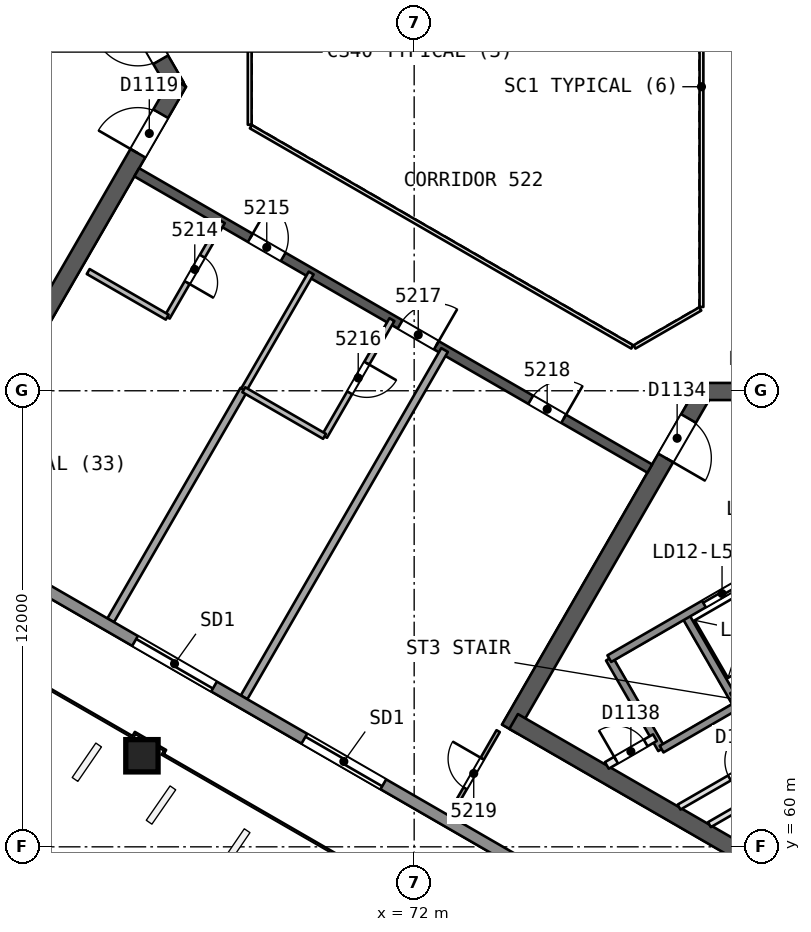
"""IFC4 building model, lengths in metres.
Left out: names, types, materials, properties, quantities, classifications, styles, units other than length and angle.
Written with IfcOpenShell. Run it as: python <this file> out.ifc"""

import sys

from ifc_helpers import new_model, si_unit, direction, frame, frame_2d, origin, origin_2d, place, context, subcontext, project, spatial, rectangle, extrude, element, fill, save


model = new_model("IFC4")
c1 = context("Model", 3, precision=1e-05, world=origin(), true_north=direction((0.0, 1.0)))
c2 = subcontext(c1, "Body", "Model", "MODEL_VIEW")
j1 = project(units=[si_unit("LENGTHUNIT", "METRE"), si_unit("PLANEANGLEUNIT", "RADIAN")], contexts=[c1])
p1 = place(None, origin())
s1 = spatial("IfcSite", under=j1, at=p1, CompositionType="ELEMENT")
p2 = place(p1, origin())
s2 = spatial("IfcBuilding", under=s1, at=p2, CompositionType="ELEMENT")
p3 = place(p2, frame((0.0, 0.0, 213.2)))
s3 = spatial("IfcBuildingStorey", under=s2, at=p3, CompositionType="ELEMENT", Elevation=213.2)
p4 = place(p3, frame((65.74, 80.0, 0.0), z_axis=(0.0, 0.0, 1.0), x_axis=(-0.499991857942, 0.866030104553, 0.0)))
e1 = element("IfcWall", 1, at=p4, inside=s3, PredefinedType="SHEAR", context=c2, shape_type="SweptSolid", body=[
    extrude(rectangle(XDim=10.25, YDim=0.45, at=frame_2d((5.125, 0.0))), origin(), (0.0, 0.0, 1.0), 3.7),
])
p5 = place(p4, frame((0.82, 0.0, 0.0)))
e2 = element("IfcOpeningElement", 2, at=p5, cuts=e1, PredefinedType="OPENING", context=c2, shape_type="SweptSolid", body=[
    extrude(rectangle(XDim=1.2, YDim=2.1, at=frame_2d((0.6, 1.05))), frame((0.0, 0.235, 0.0), z_axis=(0.0, -1.0, 0.0), x_axis=(1.0, 0.0, 0.0)), (0.0, 0.0, 1.0), 0.471),
])
p6 = place(p3, frame((60.728, 71.318, 0.0), z_axis=(0.0, 0.0, 1.0), x_axis=(0.500012416173, 0.866018235185, 0.0)))
e3 = element("IfcWall", 3, at=p6, inside=s3, PredefinedType="SHEAR", context=c2, shape_type="SweptSolid", body=[
    extrude(rectangle(XDim=10.155, YDim=0.45, at=frame_2d((5.078, 0.0))), origin(), (0.0, 0.0, 1.0), 3.7),
])
p7 = place(p6, frame((8.005, 0.0, 0.0)))
e4 = element("IfcOpeningElement", 4, at=p7, cuts=e3, PredefinedType="OPENING", context=c2, shape_type="SweptSolid", body=[
    extrude(rectangle(XDim=1.2, YDim=2.1, at=frame_2d((0.6, 1.05))), frame((0.0, 0.235, 0.0), z_axis=(0.0, -1.0, 0.0), x_axis=(1.0, 0.0, 0.0)), (0.0, 0.0, 1.0), 0.471),
])
p8 = place(p3, frame((79.63, 71.981, 0.0), z_axis=(0.0, 0.0, 1.0), x_axis=(-0.500002171595, -0.86602415001, 0.0)))
e5 = element("IfcWall", 5, at=p8, inside=s3, PredefinedType="SHEAR", context=c2, shape_type="SweptSolid", body=[
    extrude(rectangle(XDim=10.25, YDim=0.45, at=frame_2d((5.125, 0.0))), origin(), (0.0, 0.0, 1.0), 3.7),
])
p9 = place(p8, frame((0.82, 0.0, 0.0)))
e6 = element("IfcOpeningElement", 6, at=p9, cuts=e5, PredefinedType="OPENING", context=c2, shape_type="SweptSolid", body=[
    extrude(rectangle(XDim=1.2, YDim=2.1, at=frame_2d((0.6, 1.05))), frame((0.0, 0.235, 0.0), z_axis=(0.0, -1.0, 0.0), x_axis=(1.0, 0.0, 0.0)), (0.0, 0.0, 1.0), 0.471),
])
p10 = place(p3, frame((74.617, 63.299, 0.0), z_axis=(0.0, 0.0, 1.0), x_axis=(0.86602594008, -0.499999071108, 0.0)))
e7 = element("IfcWall", 7, at=p10, inside=s3, PredefinedType="SHEAR", context=c2, shape_type="SweptSolid", body=[
    extrude(rectangle(XDim=14.108, YDim=0.45, at=frame_2d((7.054, 0.0))), origin(), (0.0, 0.0, 1.0), 3.7),
])
p11 = place(p3, frame((89.655, 71.981, 0.0), z_axis=(0.0, 0.0, 1.0), x_axis=(-1.0, 0.0, 0.0)))
e8 = element("IfcWall", 8, at=p11, inside=s3, PredefinedType="SHEAR", context=c2, shape_type="SweptSolid", body=[
    extrude(rectangle(XDim=10.155, YDim=0.45, at=frame_2d((5.078, 0.0))), origin(), (0.0, 0.0, 1.0), 3.7),
])
p12 = place(p11, frame((8.005, 0.0, 0.0)))
e9 = element("IfcOpeningElement", 9, at=p12, cuts=e8, PredefinedType="OPENING", context=c2, shape_type="SweptSolid", body=[
    extrude(rectangle(XDim=1.2, YDim=2.1, at=frame_2d((0.6, 1.05))), frame((0.0, 0.235, 0.0), z_axis=(0.0, -1.0, 0.0), x_axis=(1.0, 0.0, 0.0)), (0.0, 0.0, 1.0), 0.471),
])
p13 = place(p3, frame((64.7, 77.748, 0.0), z_axis=(0.0, 0.0, 1.0), x_axis=(0.866026492143, -0.499998114903, 0.0)))
e10 = element("IfcWall", 10, at=p13, inside=s3, PredefinedType="SHEAR", context=c2, shape_type="SweptSolid", body=[
    extrude(rectangle(XDim=15.588, YDim=0.25, at=frame_2d((7.794, 0.0))), origin(), (0.0, 0.0, 1.0), 3.3),
])
p14 = place(p13, frame((3.45, 0.0, 0.0)))
e11 = element("IfcOpeningElement", 11, at=p14, cuts=e10, PredefinedType="OPENING", context=c2, shape_type="SweptSolid", body=[
    extrude(rectangle(XDim=1.0, YDim=2.1, at=frame_2d((0.5, 1.05))), frame((0.0, 0.135, 0.0), z_axis=(0.0, -1.0, 0.0), x_axis=(1.0, 0.0, 0.0)), (0.0, 0.0, 1.0), 0.271),
])
p15 = place(p13, frame((8.003, 0.0, 0.0)))
e12 = element("IfcOpeningElement", 12, at=p15, cuts=e10, PredefinedType="OPENING", context=c2, shape_type="SweptSolid", body=[
    extrude(rectangle(XDim=1.1, YDim=2.1, at=frame_2d((0.55, 1.05))), frame((0.0, 0.135, 0.0), z_axis=(0.0, -1.0, 0.0), x_axis=(1.0, 0.0, 0.0)), (0.0, 0.0, 1.0), 0.271),
])
p16 = place(p13, frame((11.971, 0.0, 0.0)))
e13 = element("IfcOpeningElement", 13, at=p16, cuts=e10, PredefinedType="OPENING", context=c2, shape_type="SweptSolid", body=[
    extrude(rectangle(XDim=1.0, YDim=2.1, at=frame_2d((0.5, 1.05))), frame((0.0, 0.135, 0.0), z_axis=(0.0, -1.0, 0.0), x_axis=(1.0, 0.0, 0.0)), (0.0, 0.0, 1.0), 0.271),
])
p17 = place(p3, frame((64.824, 62.375, 0.0), z_axis=(0.010093620709, 0.017482414954, 0.999796221231), x_axis=(-0.499922962701, -0.86583457736, 0.020187025819)))
e14 = element("IfcColumn", 14, at=p17, inside=s3, PredefinedType="COLUMN", context=c2, shape_type="SweptSolid", body=[
    extrude(rectangle(XDim=0.85, YDim=0.85, at=origin_2d()), origin(), (0.0, 0.0, 1.0), 3.701),
])
p18 = place(p3, frame((66.952, 76.448, 0.0), z_axis=(0.0, 0.0, 1.0), x_axis=(-0.499987231761, -0.866032775405, 0.0)))
e15 = element("IfcWall", 15, at=p18, inside=s3, PredefinedType="PARTITIONING", context=c2, shape_type="SweptSolid", body=[
    extrude(rectangle(XDim=2.9, YDim=0.15, at=frame_2d((1.45, 0.0))), origin(), (0.0, 0.0, 1.0), 3.3),
])
p19 = place(p18, frame((1.05, 0.0, 0.0)))
e16 = element("IfcOpeningElement", 16, at=p19, cuts=e15, PredefinedType="OPENING", context=c2, shape_type="SweptSolid", body=[
    extrude(rectangle(XDim=0.8, YDim=2.1, at=frame_2d((0.4, 1.05))), frame((0.0, 0.085, 0.0), z_axis=(0.0, -1.0, 0.0), x_axis=(1.0, 0.0, 0.0)), (0.0, 0.0, 1.0), 0.171),
])
p20 = place(p3, frame((65.502, 73.937, 0.0), z_axis=(0.0, 0.0, 1.0), x_axis=(-0.865994240961, 0.500053971709, 0.0)))
e17 = element("IfcWall", 17, at=p20, inside=s3, PredefinedType="PARTITIONING", context=c2, shape_type="SweptSolid", body=[
    extrude(rectangle(XDim=2.401, YDim=0.15, at=frame_2d((1.201, 0.0))), origin(), (0.0, 0.0, 1.0), 3.3),
])
p21 = place(p3, frame((64.014, 65.96, 0.0), z_axis=(0.0, 0.0, 1.0), x_axis=(0.499980879723, 0.8660364426, 0.0)))
e18 = element("IfcWall", 18, at=p21, inside=s3, PredefinedType="PARTITIONING", context=c2, shape_type="SweptSolid", body=[
    extrude(rectangle(XDim=7.006, YDim=0.2, at=frame_2d((3.503, 0.0))), origin(), (0.0, 0.0, 1.0), 3.3),
])
p22 = place(p3, frame((67.517, 72.027, 0.0), z_axis=(0.0, 0.0, 1.0), x_axis=(0.500018392462, 0.866014784631, 0.0)))
e19 = element("IfcWall", 19, at=p22, inside=s3, PredefinedType="PARTITIONING", context=c2, shape_type="SweptSolid", body=[
    extrude(rectangle(XDim=3.547, YDim=0.15, at=frame_2d((1.773, 0.0))), origin(), (0.0, 0.0, 1.0), 3.3),
])
p23 = place(p3, frame((71.414, 73.872, 0.0), z_axis=(0.0, 0.0, 1.0), x_axis=(-0.499966764714, -0.866044591335, 0.0)))
e20 = element("IfcWall", 20, at=p23, inside=s3, PredefinedType="PARTITIONING", context=c2, shape_type="SweptSolid", body=[
    extrude(rectangle(XDim=3.547, YDim=0.15, at=frame_2d((1.773, 0.0))), origin(), (0.0, 0.0, 1.0), 3.3),
])
p24 = place(p23, frame((1.323, 0.0, 0.0)))
e21 = element("IfcOpeningElement", 21, at=p24, cuts=e20, PredefinedType="OPENING", context=c2, shape_type="SweptSolid", body=[
    extrude(rectangle(XDim=0.9, YDim=2.1, at=frame_2d((0.45, 1.05))), frame((0.0, 0.085, 0.0), z_axis=(0.0, -1.0, 0.0), x_axis=(1.0, 0.0, 0.0)), (0.0, 0.0, 1.0), 0.171),
])
p25 = place(p3, frame((69.641, 70.8, 0.0), z_axis=(0.0, 0.0, 1.0), x_axis=(-0.866029801145, 0.49999238347, 0.0)))
e22 = element("IfcWall", 22, at=p25, inside=s3, PredefinedType="PARTITIONING", context=c2, shape_type="SweptSolid", body=[
    extrude(rectangle(XDim=2.453, YDim=0.15, at=frame_2d((1.227, 0.0))), origin(), (0.0, 0.0, 1.0), 3.3),
])
p26 = place(p3, frame((67.524, 63.933, 0.0), z_axis=(0.0, 0.0, 1.0), x_axis=(0.499993488173, 0.866029163357, 0.0)))
e23 = element("IfcWall", 23, at=p26, inside=s3, PredefinedType="PARTITIONING", context=c2, shape_type="SweptSolid", body=[
    extrude(rectangle(XDim=10.552, YDim=0.2, at=frame_2d((5.276, 0.0))), origin(), (0.0, 0.0, 1.0), 3.3),
])
p27 = place(p3, frame((72.924, 60.815, 0.0), z_axis=(0.0, 0.0, 1.0), x_axis=(0.49995513091, 0.866051307416, 0.0)))
e24 = element("IfcWall", 24, at=p27, inside=s3, PredefinedType="PARTITIONING", context=c2, shape_type="SweptSolid", body=[
    extrude(rectangle(XDim=2.573, YDim=0.1, at=frame_2d((1.287, 0.0))), origin(), (0.0, 0.0, 1.0), 3.3),
])
p28 = place(p27, frame((0.837, 0.0, 0.0)))
e25 = element("IfcOpeningElement", 25, at=p28, cuts=e24, PredefinedType="OPENING", context=c2, shape_type="SweptSolid", body=[
    extrude(rectangle(XDim=0.9, YDim=2.1, at=frame_2d((0.45, 1.05))), frame((0.0, 0.061, 0.0), z_axis=(0.0, -1.0, 0.0), x_axis=(1.0, 0.0, 0.0)), (0.0, 0.0, 1.0), 0.121),
])
p29 = place(p3, frame((88.266, 51.786, 0.0), z_axis=(0.0, 0.0, 1.0), x_axis=(-0.866026349667, 0.49999836168, 0.0)))
e26 = element("IfcWall", 26, at=p29, inside=s3, PredefinedType="SOLIDWALL", context=c2, shape_type="SweptSolid", body=[
    extrude(rectangle(XDim=51.192, YDim=0.3, at=frame_2d((25.596, 0.0))), origin(), (0.0, 0.0, 1.0), 3.3),
])
p30 = place(p29, frame((24.864, 0.0, 0.0)))
e27 = element("IfcOpeningElement", 27, at=p30, cuts=e26, PredefinedType="OPENING", context=c2, shape_type="SweptSolid", body=[
    extrude(rectangle(XDim=2.4, YDim=2.4, at=frame_2d((1.2, 1.2))), frame((0.0, 0.161, 0.0), z_axis=(0.0, -1.0, 0.0), x_axis=(1.0, 0.0, 0.0)), (0.0, 0.0, 1.0), 0.321),
])
p31 = place(p29, frame((19.719, 0.0, 0.0)))
e28 = element("IfcOpeningElement", 28, at=p31, cuts=e26, PredefinedType="OPENING", context=c2, shape_type="SweptSolid", body=[
    extrude(rectangle(XDim=2.4, YDim=2.4, at=frame_2d((1.2, 1.2))), frame((0.0, 0.161, 0.0), z_axis=(0.0, -1.0, 0.0), x_axis=(1.0, 0.0, 0.0)), (0.0, 0.0, 1.0), 0.321),
])
p32 = place(p29, frame((8.993, 0.0, 0.0)))
e29 = element("IfcOpeningElement", 29, at=p32, cuts=e26, PredefinedType="OPENING", context=c2, shape_type="SweptSolid", body=[
    extrude(rectangle(XDim=2.4, YDim=2.4, at=frame_2d((1.2, 1.2))), frame((0.0, 0.161, 0.0), z_axis=(0.0, -1.0, 0.0), x_axis=(1.0, 0.0, 0.0)), (0.0, 0.0, 1.0), 0.321),
])
p33 = place(p29, frame((38.484, 0.0, 0.0)))
e30 = element("IfcOpeningElement", 30, at=p33, cuts=e26, PredefinedType="OPENING", context=c2, shape_type="SweptSolid", body=[
    extrude(rectangle(XDim=2.4, YDim=2.4, at=frame_2d((1.2, 1.2))), frame((0.0, 0.161, 0.0), z_axis=(0.0, -1.0, 0.0), x_axis=(1.0, 0.0, 0.0)), (0.0, 0.0, 1.0), 0.321),
])
for number, where, z_axis, x_axis in (
    (31, (77.135, 64.952, 0.0), (0.0, 0.0, 1.0), (0.5, -0.866, 0.0)),
    (32, (79.127, 66.102, 0.0), (0.0, 0.0, 1.0), (0.5, -0.866, 0.0)),
):
    element("IfcWall", number, at=place(p3, frame(where, z_axis=z_axis, x_axis=x_axis)), inside=s3, PredefinedType="SOLIDWALL", context=c2, shape_type="SweptSolid", body=[
        extrude(rectangle(XDim=2.75, YDim=0.2, at=frame_2d((1.375, 0.0))), origin(), (0.0, 0.0, 1.0), 3.3),
    ])
p34 = place(p3, frame((77.135, 64.952, 0.0), z_axis=(0.0, 0.0, 1.0), x_axis=(0.866031916153, 0.499988720078, 0.0)))
e33 = element("IfcWall", 33, at=p34, inside=s3, PredefinedType="SOLIDWALL", context=c2, shape_type="SweptSolid", body=[
    extrude(rectangle(XDim=11.35, YDim=0.2, at=frame_2d((5.675, 0.0))), origin(), (0.0, 0.0, 1.0), 3.3),
])
p35 = place(p34, frame((2.875, 0.0, 0.0)))
e34 = element("IfcOpeningElement", 34, at=p35, cuts=e33, PredefinedType="OPENING", context=c2, shape_type="SweptSolid", body=[
    extrude(rectangle(XDim=1.1, YDim=2.1, at=frame_2d((0.55, 1.05))), frame((0.0, 0.11, 0.0), z_axis=(0.0, -1.0, 0.0), x_axis=(1.0, 0.0, 0.0)), (0.0, 0.0, 1.0), 0.221),
])
p36 = place(p34, frame((5.125, 0.0, 0.0)))
e35 = element("IfcOpeningElement", 35, at=p36, cuts=e33, PredefinedType="OPENING", context=c2, shape_type="SweptSolid", body=[
    extrude(rectangle(XDim=1.1, YDim=2.1, at=frame_2d((0.55, 1.05))), frame((0.0, 0.11, 0.0), z_axis=(0.0, -1.0, 0.0), x_axis=(1.0, 0.0, 0.0)), (0.0, 0.0, 1.0), 0.221),
])
p37 = place(p34, frame((7.375, 0.0, 0.0)))
e36 = element("IfcOpeningElement", 36, at=p37, cuts=e33, PredefinedType="OPENING", context=c2, shape_type="SweptSolid", body=[
    extrude(rectangle(XDim=1.1, YDim=2.1, at=frame_2d((0.55, 1.05))), frame((0.0, 0.11, 0.0), z_axis=(0.0, -1.0, 0.0), x_axis=(1.0, 0.0, 0.0)), (0.0, 0.0, 1.0), 0.221),
])
p38 = place(p3, frame((77.07, 62.143, 0.0), z_axis=(0.0, 0.0, 1.0), x_axis=(0.866013036001, 0.500021421018, 0.0)))
e37 = element("IfcWall", 37, at=p38, inside=s3, PredefinedType="PARTITIONING", context=c2, shape_type="SweptSolid", body=[
    extrude(rectangle(XDim=1.461, YDim=0.2, at=frame_2d((0.73, 0.0))), origin(), (0.0, 0.0, 1.0), 3.3),
])
p39 = place(p38, frame((0.281, 0.0, 0.0)))
e38 = element("IfcOpeningElement", 38, at=p39, cuts=e37, PredefinedType="OPENING", context=c2, shape_type="SweptSolid", body=[
    extrude(rectangle(XDim=0.9, YDim=2.1, at=frame_2d((0.45, 1.05))), frame((0.0, 0.11, 0.0), z_axis=(0.0, -1.0, 0.0), x_axis=(1.0, 0.0, 0.0)), (0.0, 0.0, 1.0), 0.221),
])
p40 = place(p3, frame((80.367, 63.954, 0.0), z_axis=(0.0, 0.0, 1.0), x_axis=(0.866026575979, 0.499997969693, 0.0)))
e39 = element("IfcWall", 39, at=p40, inside=s3, PredefinedType="SOLIDWALL", context=c2, shape_type="SweptSolid", body=[
    extrude(rectangle(XDim=6.75, YDim=0.2, at=frame_2d((3.375, 0.0))), origin(), (0.0, 0.0, 1.0), 3.3),
])
p41 = place(p3, frame((78.51, 62.57, 0.0), z_axis=(0.0, 0.0, 1.0), x_axis=(0.866053019151, 0.499952165731, 0.0)))
e40 = element("IfcWall", 40, at=p41, inside=s3, PredefinedType="SOLIDWALL", context=c2, shape_type="SweptSolid", body=[
    extrude(rectangle(XDim=2.3, YDim=0.2, at=frame_2d((1.15, 0.0))), origin(), (0.0, 0.0, 1.0), 3.3),
])
p42 = place(p3, frame((78.97, 61.046, 0.0), z_axis=(0.0, 0.0, 1.0), x_axis=(0.866044057189, 0.499967689963, 0.0)))
e41 = element("IfcWall", 41, at=p42, inside=s3, PredefinedType="PARTITIONING", context=c2, shape_type="SweptSolid", body=[
    extrude(rectangle(XDim=3.964, YDim=0.15, at=frame_2d((1.982, 0.0))), origin(), (0.0, 0.0, 1.0), 3.3),
])
p43 = place(p42, frame((1.532, 0.0, 0.0)))
e42 = element("IfcOpeningElement", 42, at=p43, cuts=e41, PredefinedType="OPENING", context=c2, shape_type="SweptSolid", body=[
    extrude(rectangle(XDim=0.9, YDim=2.1, at=frame_2d((0.45, 1.05))), frame((0.0, 0.085, 0.0), z_axis=(0.0, -1.0, 0.0), x_axis=(1.0, 0.0, 0.0)), (0.0, 0.0, 1.0), 0.171),
])
p44 = place(p3, frame((79.77, 60.584, 0.0), z_axis=(0.0, 0.0, 1.0), x_axis=(0.866021168401, 0.500007335828, 0.0)))
e43 = element("IfcWall", 43, at=p44, inside=s3, PredefinedType="PARTITIONING", context=c2, shape_type="SweptSolid", body=[
    extrude(rectangle(XDim=2.077, YDim=0.15, at=frame_2d((1.039, 0.0))), origin(), (0.0, 0.0, 1.0), 3.3),
])
p45 = place(p3, frame((79.56, 74.206, 0.0), z_axis=(0.0, 0.0, 1.0), x_axis=(0.0, 1.0, 0.0)))
e44 = element("IfcWall", 44, at=p45, inside=s3, PredefinedType="PARTITIONING", context=c2, shape_type="SweptSolid", body=[
    extrude(rectangle(XDim=11.588, YDim=0.1, at=frame_2d((5.794, 0.0))), origin(), (0.0, 0.0, 1.0), 3.3),
])
p46 = place(p3, frame((67.672, 81.0, 0.0), z_axis=(0.0, 0.0, 1.0), x_axis=(0.0, -1.0, 0.0)))
e45 = element("IfcWall", 45, at=p46, inside=s3, PredefinedType="PARTITIONING", context=c2, shape_type="SweptSolid", body=[
    extrude(rectangle(XDim=2.0, YDim=0.1, at=frame_2d((1.0, 0.0))), origin(), (0.0, 0.0, 1.0), 3.3),
])
p47 = place(p3, frame((67.702, 78.948, 0.0), z_axis=(0.0, 0.0, 1.0), x_axis=(0.866026658274, -0.499997827154, 0.0)))
e46 = element("IfcWall", 46, at=p47, inside=s3, PredefinedType="PARTITIONING", context=c2, shape_type="SweptSolid", body=[
    extrude(rectangle(XDim=11.588, YDim=0.1, at=frame_2d((5.794, 0.0))), origin(), (0.0, 0.0, 1.0), 3.3),
])
p48 = place(p3, frame((77.798, 73.154, 0.0), z_axis=(0.0, 0.0, 1.0), x_axis=(0.866041268327, 0.499972520799, 0.0)))
e47 = element("IfcWall", 47, at=p48, inside=s3, PredefinedType="PARTITIONING", context=c2, shape_type="SweptSolid", body=[
    extrude(rectangle(XDim=2.0, YDim=0.1, at=frame_2d((1.0, 0.0))), origin(), (0.0, 0.0, 1.0), 3.3),
])
p49 = place(p19, origin())
e48 = element("IfcDoor", 48, at=p49, inside=s3, OperationType="SINGLE_SWING_RIGHT", PredefinedType="NOTDEFINED", context=c2, shape_type="SweptSolid", body=[
    extrude(rectangle(XDim=0.8, YDim=2.1, at=frame_2d((0.4, 1.05))), frame((0.0, 0.025, 0.0), z_axis=(0.0, -1.0, 0.0), x_axis=(1.0, 0.0, 0.0)), (0.0, 0.0, 1.0), 0.05),
])
fill(e16, e48)
p50 = place(p14, origin())
e49 = element("IfcDoor", 49, at=p50, inside=s3, OperationType="SINGLE_SWING_LEFT", PredefinedType="NOTDEFINED", context=c2, shape_type="SweptSolid", body=[
    extrude(rectangle(XDim=1.0, YDim=2.1, at=frame_2d((0.5, 1.05))), frame((0.0, 0.025, 0.0), z_axis=(0.0, -1.0, 0.0), x_axis=(1.0, 0.0, 0.0)), (0.0, 0.0, 1.0), 0.05),
])
fill(e11, e49)
p51 = place(p24, origin())
e50 = element("IfcDoor", 50, at=p51, inside=s3, OperationType="SINGLE_SWING_LEFT", PredefinedType="NOTDEFINED", context=c2, shape_type="SweptSolid", body=[
    extrude(rectangle(XDim=0.9, YDim=2.1, at=frame_2d((0.45, 1.05))), frame((0.0, 0.025, 0.0), z_axis=(0.0, -1.0, 0.0), x_axis=(1.0, 0.0, 0.0)), (0.0, 0.0, 1.0), 0.05),
])
fill(e21, e50)
p52 = place(p15, origin())
e51 = element("IfcDoor", 51, at=p52, inside=s3, OperationType="SINGLE_SWING_RIGHT", PredefinedType="NOTDEFINED", context=c2, shape_type="SweptSolid", body=[
    extrude(rectangle(XDim=1.1, YDim=2.1, at=frame_2d((0.55, 1.05))), frame((0.0, 0.025, 0.0), z_axis=(0.0, -1.0, 0.0), x_axis=(1.0, 0.0, 0.0)), (0.0, 0.0, 1.0), 0.05),
])
fill(e12, e51)
p53 = place(p16, origin())
e52 = element("IfcDoor", 52, at=p53, inside=s3, OperationType="SINGLE_SWING_RIGHT", PredefinedType="NOTDEFINED", context=c2, shape_type="SweptSolid", body=[
    extrude(rectangle(XDim=1.0, YDim=2.1, at=frame_2d((0.5, 1.05))), frame((0.0, 0.025, 0.0), z_axis=(0.0, -1.0, 0.0), x_axis=(1.0, 0.0, 0.0)), (0.0, 0.0, 1.0), 0.05),
])
fill(e13, e52)
p54 = place(p28, origin())
e53 = element("IfcDoor", 53, at=p54, inside=s3, OperationType="SINGLE_SWING_RIGHT", PredefinedType="NOTDEFINED", context=c2, shape_type="SweptSolid", body=[
    extrude(rectangle(XDim=0.9, YDim=2.1, at=frame_2d((0.45, 1.05))), frame((0.0, 0.025, 0.0), z_axis=(0.0, -1.0, 0.0), x_axis=(1.0, 0.0, 0.0)), (0.0, 0.0, 1.0), 0.05),
])
fill(e25, e53)
p55 = place(p30, origin())
e54 = element("IfcDoor", 54, at=p55, inside=s3, OperationType="SLIDING_TO_LEFT", PredefinedType="NOTDEFINED", context=c2, shape_type="SweptSolid", body=[
    extrude(rectangle(XDim=2.4, YDim=2.4, at=frame_2d((1.2, 1.2))), frame((0.0, 0.025, 0.0), z_axis=(0.0, -1.0, 0.0), x_axis=(1.0, 0.0, 0.0)), (0.0, 0.0, 1.0), 0.05),
])
fill(e27, e54)
p56 = place(p31, origin())
e55 = element("IfcDoor", 55, at=p56, inside=s3, OperationType="SLIDING_TO_RIGHT", PredefinedType="NOTDEFINED", context=c2, shape_type="SweptSolid", body=[
    extrude(rectangle(XDim=2.4, YDim=2.4, at=frame_2d((1.2, 1.2))), frame((0.0, 0.025, 0.0), z_axis=(0.0, -1.0, 0.0), x_axis=(1.0, 0.0, 0.0)), (0.0, 0.0, 1.0), 0.05),
])
fill(e28, e55)
p57 = place(p5, origin())
e56 = element("IfcDoor", 56, at=p57, inside=s3, OperationType="SINGLE_SWING_RIGHT", PredefinedType="NOTDEFINED", context=c2, shape_type="SweptSolid", body=[
    extrude(rectangle(XDim=1.2, YDim=2.1, at=frame_2d((0.6, 1.05))), frame((0.0, 0.025, 0.0), z_axis=(0.0, -1.0, 0.0), x_axis=(1.0, 0.0, 0.0)), (0.0, 0.0, 1.0), 0.05),
])
fill(e2, e56)
p58 = place(p7, origin())
e57 = element("IfcDoor", 57, at=p58, inside=s3, OperationType="SINGLE_SWING_LEFT", PredefinedType="NOTDEFINED", context=c2, shape_type="SweptSolid", body=[
    extrude(rectangle(XDim=1.2, YDim=2.1, at=frame_2d((0.6, 1.05))), frame((0.0, 0.025, 0.0), z_axis=(0.0, -1.0, 0.0), x_axis=(1.0, 0.0, 0.0)), (0.0, 0.0, 1.0), 0.05),
])
fill(e4, e57)
p59 = place(p9, origin())
e58 = element("IfcDoor", 58, at=p59, inside=s3, OperationType="SINGLE_SWING_RIGHT", PredefinedType="NOTDEFINED", context=c2, shape_type="SweptSolid", body=[
    extrude(rectangle(XDim=1.2, YDim=2.1, at=frame_2d((0.6, 1.05))), frame((0.0, 0.025, 0.0), z_axis=(0.0, -1.0, 0.0), x_axis=(1.0, 0.0, 0.0)), (0.0, 0.0, 1.0), 0.05),
])
fill(e6, e58)
p60 = place(p35, origin())
e59 = element("IfcDoor", 59, at=p60, inside=s3, OperationType="SLIDING_TO_LEFT", PredefinedType="NOTDEFINED", context=c2, shape_type="SweptSolid", body=[
    extrude(rectangle(XDim=1.1, YDim=2.1, at=frame_2d((0.55, 1.05))), frame((0.0, 0.025, 0.0), z_axis=(0.0, -1.0, 0.0), x_axis=(1.0, 0.0, 0.0)), (0.0, 0.0, 1.0), 0.05),
])
fill(e34, e59)
p61 = place(p43, origin())
e60 = element("IfcDoor", 60, at=p61, inside=s3, OperationType="SINGLE_SWING_RIGHT", PredefinedType="NOTDEFINED", context=c2, shape_type="SweptSolid", body=[
    extrude(rectangle(XDim=0.9, YDim=2.1, at=frame_2d((0.45, 1.05))), frame((0.0, 0.025, 0.0), z_axis=(0.0, -1.0, 0.0), x_axis=(1.0, 0.0, 0.0)), (0.0, 0.0, 1.0), 0.05),
])
fill(e42, e60)
p62 = place(p39, origin())
e61 = element("IfcDoor", 61, at=p62, inside=s3, OperationType="SINGLE_SWING_LEFT", PredefinedType="NOTDEFINED", context=c2, shape_type="SweptSolid", body=[
    extrude(rectangle(XDim=0.9, YDim=2.1, at=frame_2d((0.45, 1.05))), frame((0.0, 0.025, 0.0), z_axis=(0.0, -1.0, 0.0), x_axis=(1.0, 0.0, 0.0)), (0.0, 0.0, 1.0), 0.05),
])
fill(e38, e61)
save(model, sys.argv[1])
